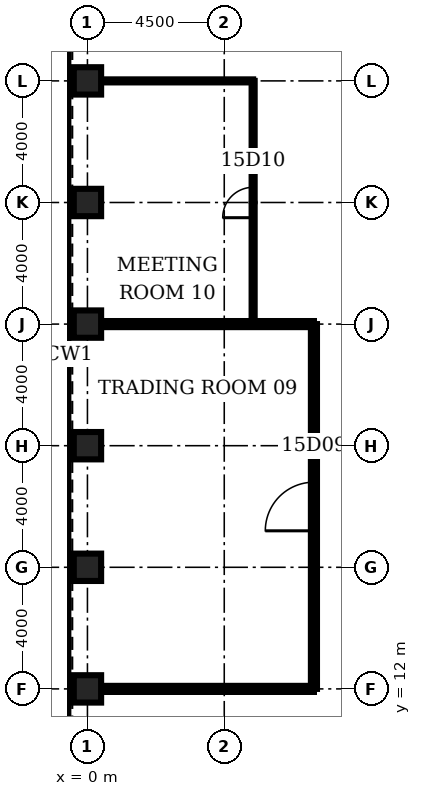
"""IFC4 building model, lengths in metres.
Left out: names, types, materials, properties, quantities, classifications, styles, units other than length and angle.
Written with IfcOpenShell. Run it as: python <this file> out.ifc"""

import sys

from ifc_helpers import new_model, si_unit, direction, frame, frame_2d, origin, origin_2d, place, context, subcontext, project, spatial, rectangle, hollow_rectangle, extrude, element, fill, save


model = new_model("IFC4")
c1 = context("Model", 3, precision=1e-05, world=origin(), true_north=direction((0.0, 1.0)))
c2 = subcontext(c1, "Body", "Model", "MODEL_VIEW")
j1 = project(units=[si_unit("LENGTHUNIT", "METRE"), si_unit("PLANEANGLEUNIT", "RADIAN")], contexts=[c1])
p1 = place(None, origin())
s1 = spatial("IfcSite", under=j1, at=p1, CompositionType="ELEMENT")
p2 = place(p1, origin())
s2 = spatial("IfcBuilding", under=s1, at=p2, CompositionType="ELEMENT")
p3 = place(p2, frame((0.0, 0.0, 72.5)))
s3 = spatial("IfcBuildingStorey", under=s2, at=p3, CompositionType="ELEMENT", Elevation=72.5)
for number, where, z_axis, x_axis in (
    (1, (0.0, 32.0, 0.0), (0.0, 0.0, 1.0), (1.0, 0.0, 0.0)),
    (2, (0.0, 28.0, 0.0), (0.0, 0.0, 1.0), (1.0, 0.0, 0.0)),
    (3, (0.0, 24.0, 0.0), (0.0, 0.0, 1.0), (1.0, 0.0, 0.0)),
    (4, (0.0, 20.0, 0.0), (0.0, 0.0, 1.0), (1.0, 0.0, 0.0)),
    (5, (0.0, 16.0, 0.0), (0.0, 0.0, 1.0), (1.0, 0.0, 0.0)),
    (6, (0.0, 12.0, 0.0), (0.0, 0.0, 1.0), (1.0, 0.0, 0.0)),
):
    element("IfcColumn", number, at=place(p3, frame(where, z_axis=z_axis, x_axis=x_axis)), inside=s3, PredefinedType="COLUMN", context=c2, shape_type="SweptSolid", body=[
        extrude(hollow_rectangle(XDim=0.9, YDim=0.9, WallThickness=0.12, at=origin_2d()), origin(), (0.0, 0.0, 1.0), 4.5),
    ])
for number, where, z_axis, x_axis in (
    (7, (0.45, 12.0, 0.0), (0.0, 0.0, 1.0), (1.0, 0.0, 0.0)),
    (8, (0.45, 24.0, 0.0), (0.0, 0.0, 1.0), (1.0, 0.0, 0.0)),
):
    element("IfcWall", number, at=place(p3, frame(where, z_axis=z_axis, x_axis=x_axis)), inside=s3, PredefinedType="PARTITIONING", context=c2, shape_type="SweptSolid", body=[
        extrude(rectangle(XDim=7.0, YDim=0.2, at=frame_2d((3.5, 0.0))), origin(), (0.0, 0.0, 1.0), 3.0),
    ])
p4 = place(p3, frame((0.45, 32.0, 0.0), z_axis=(0.0, 0.0, 1.0), x_axis=(1.0, 0.0, 0.0)))
e9 = element("IfcWall", 9, at=p4, inside=s3, PredefinedType="PARTITIONING", context=c2, shape_type="SweptSolid", body=[
    extrude(rectangle(XDim=5.0, YDim=0.1, at=frame_2d((2.5, 0.0))), origin(), (0.0, 0.0, 1.0), 3.0),
])
p5 = place(p3, frame((5.45, 24.0, 0.0), z_axis=(0.0, 0.0, 1.0), x_axis=(0.0, 1.0, 0.0)))
e10 = element("IfcWall", 10, at=p5, inside=s3, PredefinedType="PARTITIONING", context=c2, shape_type="SweptSolid", body=[
    extrude(rectangle(XDim=8.0, YDim=0.1, at=frame_2d((4.0, 0.0))), origin(), (0.0, 0.0, 1.0), 3.0),
])
p6 = place(p5, frame((3.5, 0.0, 0.0)))
e11 = element("IfcOpeningElement", 11, at=p6, cuts=e10, PredefinedType="OPENING", context=c2, shape_type="SweptSolid", body=[
    extrude(rectangle(XDim=1.0, YDim=2.1, at=frame_2d((0.5, 1.05))), frame((0.0, 0.06, 0.0), z_axis=(0.0, -1.0, 0.0), x_axis=(1.0, 0.0, 0.0)), (0.0, 0.0, 1.0), 0.12),
])
p7 = place(p3, frame((7.45, 12.0, 0.0), z_axis=(0.0, 0.0, 1.0), x_axis=(0.0, 1.0, 0.0)))
e12 = element("IfcWall", 12, at=p7, inside=s3, PredefinedType="PARTITIONING", context=c2, shape_type="SweptSolid", body=[
    extrude(rectangle(XDim=12.0, YDim=0.2, at=frame_2d((6.0, 0.0))), origin(), (0.0, 0.0, 1.0), 3.0),
])
p8 = place(p7, frame((5.2, 0.0, 0.0)))
e13 = element("IfcOpeningElement", 13, at=p8, cuts=e12, PredefinedType="OPENING", context=c2, shape_type="SweptSolid", body=[
    extrude(rectangle(XDim=1.6, YDim=2.1, at=frame_2d((0.8, 1.05))), frame((0.0, 0.11, 0.0), z_axis=(0.0, -1.0, 0.0), x_axis=(1.0, 0.0, 0.0)), (0.0, 0.0, 1.0), 0.22),
])
p9 = place(p8, origin())
e14 = element("IfcDoor", 14, at=p9, inside=s3, OperationType="SINGLE_SWING_LEFT", PredefinedType="DOOR", context=c2, shape_type="SweptSolid", body=[
    extrude(rectangle(XDim=1.6, YDim=2.1, at=frame_2d((0.8, 1.05))), frame((0.0, 0.025, 0.0), z_axis=(0.0, -1.0, 0.0), x_axis=(1.0, 0.0, 0.0)), (0.0, 0.0, 1.0), 0.05),
])
fill(e13, e14)
p10 = place(p6, origin())
e15 = element("IfcDoor", 15, at=p10, inside=s3, OperationType="SINGLE_SWING_LEFT", PredefinedType="DOOR", context=c2, shape_type="SweptSolid", body=[
    extrude(rectangle(XDim=1.0, YDim=2.1, at=frame_2d((0.5, 1.05))), frame((0.0, 0.025, 0.0), z_axis=(0.0, -1.0, 0.0), x_axis=(1.0, 0.0, 0.0)), (0.0, 0.0, 1.0), 0.05),
])
fill(e11, e15)
save(model, sys.argv[1])
